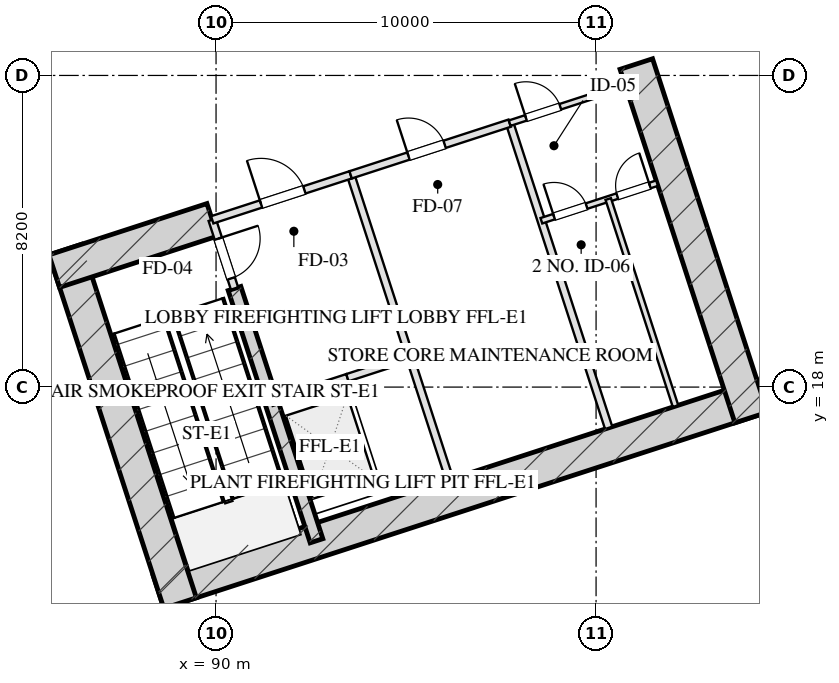
"""IFC4 building model, lengths in metres.
Left out: names, types, materials, properties, quantities, classifications, styles, units other than length and angle.
Written with IfcOpenShell. Run it as: python <this file> out.ifc"""

import sys

from ifc_helpers import new_model, si_unit, direction, frame, frame_2d, origin, place, context, subcontext, project, spatial, rectangle, extrude, element, fill, save


model = new_model("IFC4")
c1 = context("Model", 3, precision=1e-05, world=origin(), true_north=direction((0.0, 1.0)))
c2 = subcontext(c1, "Body", "Model", "MODEL_VIEW")
j1 = project(units=[si_unit("LENGTHUNIT", "METRE"), si_unit("PLANEANGLEUNIT", "RADIAN")], contexts=[c1])
p1 = place(None, origin())
s1 = spatial("IfcSite", under=j1, at=p1, CompositionType="ELEMENT")
p2 = place(p1, origin())
s2 = spatial("IfcBuilding", under=s1, at=p2, CompositionType="ELEMENT")
p3 = place(p2, frame((0.0, 0.0, -12.0)))
s3 = spatial("IfcBuildingStorey", under=s2, at=p3, CompositionType="ELEMENT", Elevation=-12.0)
p4 = place(p3, frame((88.487, 12.605, 0.0), z_axis=(0.0, 0.0, 1.0), x_axis=(0.951055016115, 0.309021611416, 0.0)))
e1 = element("IfcWall", 1, at=p4, inside=s3, PredefinedType="SHEAR", context=c2, shape_type="SweptSolid", body=[
    extrude(rectangle(XDim=16.7, YDim=0.9, at=frame_2d((8.35, 0.0))), origin(), (0.0, 0.0, 1.0), 6.0),
])
p5 = place(p3, frame((86.032, 21.618, 0.0), z_axis=(0.0, 0.0, 1.0), x_axis=(0.30901438634, -0.951057363693, 0.0)))
e2 = element("IfcWall", 2, at=p5, inside=s3, PredefinedType="SHEAR", context=c2, shape_type="SweptSolid", body=[
    extrude(rectangle(XDim=9.78, YDim=0.9, at=frame_2d((4.89, 0.0))), origin(), (0.0, 0.0, 1.0), 6.0),
])
p6 = place(p3, frame((101.059, 26.5, 0.0), z_axis=(0.0, 0.0, 1.0), x_axis=(0.309021722829, -0.951054979914, 0.0)))
e3 = element("IfcWall", 3, at=p6, inside=s3, PredefinedType="SHEAR", context=c2, shape_type="SweptSolid", body=[
    extrude(rectangle(XDim=9.78, YDim=0.9, at=frame_2d((4.89, 0.0))), origin(), (0.0, 0.0, 1.0), 6.0),
])
p7 = place(p3, frame((90.486, 20.594, 0.0), z_axis=(0.0, 0.0, 1.0), x_axis=(0.309020428229, -0.951055400562, 0.0)))
e4 = element("IfcWall", 4, at=p7, inside=s3, PredefinedType="SHEAR", context=c2, shape_type="SweptSolid", body=[
    extrude(rectangle(XDim=6.98, YDim=0.35, at=frame_2d((3.49, 0.0))), origin(), (0.0, 0.0, 1.0), 6.0),
])
p8 = place(p3, frame((85.743, 21.051, 0.0), z_axis=(0.0, 0.0, 1.0), x_axis=(0.951063623806, 0.308995118848, 0.0)))
e5 = element("IfcWall", 5, at=p8, inside=s3, PredefinedType="SHEAR", context=c2, shape_type="SweptSolid", body=[
    extrude(rectangle(XDim=4.37, YDim=0.9, at=frame_2d((2.185, 0.0))), origin(), (0.0, 0.0, 1.0), 6.0),
])
p9 = place(p3, frame((89.899, 22.401, 0.0), z_axis=(0.0, 0.0, 1.0), x_axis=(0.308932062672, -0.951084108086, 0.0)))
e6 = element("IfcWall", 6, at=p9, inside=s3, PredefinedType="PARTITIONING", context=c2, shape_type="SweptSolid", body=[
    extrude(rectangle(XDim=1.9, YDim=0.2, at=frame_2d((0.95, 0.0))), origin(), (0.0, 0.0, 1.0), 5.635),
])
p10 = place(p9, frame((0.52, 0.0, 0.0)))
e7 = element("IfcOpeningElement", 7, at=p10, cuts=e6, PredefinedType="OPENING", context=c2, shape_type="SweptSolid", body=[
    extrude(rectangle(XDim=1.1, YDim=2.05, at=frame_2d((0.55, 1.025))), frame((0.0, 0.11, 0.0), z_axis=(0.0, -1.0, 0.0), x_axis=(1.0, 0.0, 0.0)), (0.0, 0.0, 1.0), 0.22),
])
p11 = place(p3, frame((93.542, 23.585, 0.0), z_axis=(0.0, 0.0, 1.0), x_axis=(0.309042196757, -0.951048327176, 0.0)))
e8 = element("IfcWall", 8, at=p11, inside=s3, PredefinedType="PARTITIONING", context=c2, shape_type="SweptSolid", body=[
    extrude(rectangle(XDim=8.43, YDim=0.2, at=frame_2d((4.215, 0.0))), origin(), (0.0, 0.0, 1.0), 5.635),
])
p12 = place(p3, frame((89.899, 22.401, 0.0), z_axis=(0.0, 0.0, 1.0), x_axis=(0.951046716504, 0.309047153403, 0.0)))
e9 = element("IfcWall", 9, at=p12, inside=s3, PredefinedType="PARTITIONING", context=c2, shape_type="SweptSolid", body=[
    extrude(rectangle(XDim=3.83, YDim=0.2, at=frame_2d((1.915, 0.0))), origin(), (0.0, 0.0, 1.0), 5.635),
])
p13 = place(p12, frame((1.35, 0.0, 0.0)))
e10 = element("IfcOpeningElement", 10, at=p13, cuts=e9, PredefinedType="OPENING", context=c2, shape_type="SweptSolid", body=[
    extrude(rectangle(XDim=1.2, YDim=2.05, at=frame_2d((0.6, 1.025))), frame((0.0, 0.11, 0.0), z_axis=(0.0, -1.0, 0.0), x_axis=(1.0, 0.0, 0.0)), (0.0, 0.0, 1.0), 0.22),
])
p14 = place(p3, frame((91.46, 17.598, 0.0), z_axis=(0.0, 0.0, 1.0), x_axis=(0.951062257173, 0.308999325213, 0.0)))
e11 = element("IfcWall", 11, at=p14, inside=s3, PredefinedType="PARTITIONING", context=c2, shape_type="SweptSolid", body=[
    extrude(rectangle(XDim=2.1, YDim=0.2, at=frame_2d((1.05, 0.0))), origin(), (0.0, 0.0, 1.0), 5.635),
])
p15 = place(p3, frame((93.457, 18.247, 0.0), z_axis=(0.0, 0.0, 1.0), x_axis=(0.951041328149, 0.309063734775, 0.0)))
e12 = element("IfcWall", 12, at=p15, inside=s3, PredefinedType="PARTITIONING", context=c2, shape_type="SweptSolid", body=[
    extrude(rectangle(XDim=1.73, YDim=0.2, at=frame_2d((0.865, 0.0))), origin(), (0.0, 0.0, 1.0), 5.635),
])
p16 = place(p3, frame((97.727, 24.944, 0.0), z_axis=(0.0, 0.0, 1.0), x_axis=(0.309016001439, -0.951056838919, 0.0)))
e13 = element("IfcWall", 13, at=p16, inside=s3, PredefinedType="PARTITIONING", context=c2, shape_type="SweptSolid", body=[
    extrude(rectangle(XDim=8.43, YDim=0.2, at=frame_2d((4.215, 0.0))), origin(), (0.0, 0.0, 1.0), 5.635),
])
p17 = place(p3, frame((93.542, 23.585, 0.0), z_axis=(0.0, 0.0, 1.0), x_axis=(0.951063829732, 0.308994485023, 0.0)))
e14 = element("IfcWall", 14, at=p17, inside=s3, PredefinedType="PARTITIONING", context=c2, shape_type="SweptSolid", body=[
    extrude(rectangle(XDim=4.4, YDim=0.2, at=frame_2d((2.2, 0.0))), origin(), (0.0, 0.0, 1.0), 5.635),
])
p18 = place(p17, frame((1.6, 0.0, 0.0)))
e15 = element("IfcOpeningElement", 15, at=p18, cuts=e14, PredefinedType="OPENING", context=c2, shape_type="SweptSolid", body=[
    extrude(rectangle(XDim=1.0, YDim=2.05, at=frame_2d((0.5, 1.025))), frame((0.0, 0.11, 0.0), z_axis=(0.0, -1.0, 0.0), x_axis=(1.0, 0.0, 0.0)), (0.0, 0.0, 1.0), 0.22),
])
p19 = place(p3, frame((97.727, 24.944, 0.0), z_axis=(0.0, 0.0, 1.0), x_axis=(0.951036872128, 0.309077446369, 0.0)))
e16 = element("IfcWall", 16, at=p19, inside=s3, PredefinedType="PARTITIONING", context=c2, shape_type="SweptSolid", body=[
    extrude(rectangle(XDim=3.2, YDim=0.15, at=frame_2d((1.6, 0.0))), origin(), (0.0, 0.0, 1.0), 5.635),
])
p20 = place(p19, frame((0.45, 0.0, 0.0)))
e17 = element("IfcOpeningElement", 17, at=p20, cuts=e16, PredefinedType="OPENING", context=c2, shape_type="SweptSolid", body=[
    extrude(rectangle(XDim=0.95, YDim=2.05, at=frame_2d((0.475, 1.025))), frame((0.0, 0.085, 0.0), z_axis=(0.0, -1.0, 0.0), x_axis=(1.0, 0.0, 0.0)), (0.0, 0.0, 1.0), 0.17),
])
p21 = place(p3, frame((98.561, 22.376, 0.0), z_axis=(0.0, 0.0, 1.0), x_axis=(0.95104415986, 0.309055020985, 0.0)))
e18 = element("IfcWall", 18, at=p21, inside=s3, PredefinedType="PARTITIONING", context=c2, shape_type="SweptSolid", body=[
    extrude(rectangle(XDim=3.2, YDim=0.15, at=frame_2d((1.6, 0.0))), origin(), (0.0, 0.0, 1.0), 5.635),
])
p22 = place(p21, frame((0.35, 0.0, 0.0)))
e19 = element("IfcOpeningElement", 19, at=p22, cuts=e18, PredefinedType="OPENING", context=c2, shape_type="SweptSolid", body=[
    extrude(rectangle(XDim=0.9, YDim=2.05, at=frame_2d((0.45, 1.025))), frame((0.0, 0.085, 0.0), z_axis=(0.0, -1.0, 0.0), x_axis=(1.0, 0.0, 0.0)), (0.0, 0.0, 1.0), 0.17),
])
p23 = place(p21, frame((2.1, 0.0, 0.0)))
e20 = element("IfcOpeningElement", 20, at=p23, cuts=e18, PredefinedType="OPENING", context=c2, shape_type="SweptSolid", body=[
    extrude(rectangle(XDim=0.9, YDim=2.05, at=frame_2d((0.45, 1.025))), frame((0.0, 0.085, 0.0), z_axis=(0.0, -1.0, 0.0), x_axis=(1.0, 0.0, 0.0)), (0.0, 0.0, 1.0), 0.17),
])
p24 = place(p3, frame((100.32, 22.948, 0.0), z_axis=(0.0, 0.0, 1.0), x_axis=(0.309035009867, -0.951050662518, 0.0)))
e21 = element("IfcWall", 21, at=p24, inside=s3, PredefinedType="PARTITIONING", context=c2, shape_type="SweptSolid", body=[
    extrude(rectangle(XDim=5.73, YDim=0.15, at=frame_2d((2.865, 0.0))), origin(), (0.0, 0.0, 1.0), 5.635),
])
p25 = place(p10, origin())
e22 = element("IfcDoor", 22, at=p25, inside=s3, OperationType="SINGLE_SWING_LEFT", PredefinedType="DOOR", context=c2, shape_type="SweptSolid", body=[
    extrude(rectangle(XDim=1.1, YDim=2.05, at=frame_2d((0.55, 1.025))), frame((0.0, 0.025, 0.0), z_axis=(0.0, -1.0, 0.0), x_axis=(1.0, 0.0, 0.0)), (0.0, 0.0, 1.0), 0.05),
])
fill(e7, e22)
p26 = place(p13, origin())
e23 = element("IfcDoor", 23, at=p26, inside=s3, OperationType="SINGLE_SWING_LEFT", PredefinedType="DOOR", context=c2, shape_type="SweptSolid", body=[
    extrude(rectangle(XDim=1.2, YDim=2.05, at=frame_2d((0.6, 1.025))), frame((0.0, 0.025, 0.0), z_axis=(0.0, -1.0, 0.0), x_axis=(1.0, 0.0, 0.0)), (0.0, 0.0, 1.0), 0.05),
])
fill(e10, e23)
p27 = place(p18, origin())
e24 = element("IfcDoor", 24, at=p27, inside=s3, OperationType="SINGLE_SWING_LEFT", PredefinedType="DOOR", context=c2, shape_type="SweptSolid", body=[
    extrude(rectangle(XDim=1.0, YDim=2.05, at=frame_2d((0.5, 1.025))), frame((0.0, 0.025, 0.0), z_axis=(0.0, -1.0, 0.0), x_axis=(1.0, 0.0, 0.0)), (0.0, 0.0, 1.0), 0.05),
])
fill(e15, e24)
p28 = place(p20, origin())
e25 = element("IfcDoor", 25, at=p28, inside=s3, OperationType="SINGLE_SWING_LEFT", PredefinedType="DOOR", context=c2, shape_type="SweptSolid", body=[
    extrude(rectangle(XDim=0.95, YDim=2.05, at=frame_2d((0.475, 1.025))), frame((0.0, 0.025, 0.0), z_axis=(0.0, -1.0, 0.0), x_axis=(1.0, 0.0, 0.0)), (0.0, 0.0, 1.0), 0.05),
])
fill(e17, e25)
p29 = place(p22, origin())
e26 = element("IfcDoor", 26, at=p29, inside=s3, OperationType="SINGLE_SWING_LEFT", PredefinedType="DOOR", context=c2, shape_type="SweptSolid", body=[
    extrude(rectangle(XDim=0.9, YDim=2.05, at=frame_2d((0.45, 1.025))), frame((0.0, 0.025, 0.0), z_axis=(0.0, -1.0, 0.0), x_axis=(1.0, 0.0, 0.0)), (0.0, 0.0, 1.0), 0.05),
])
fill(e19, e26)
p30 = place(p23, origin())
e27 = element("IfcDoor", 27, at=p30, inside=s3, OperationType="SINGLE_SWING_RIGHT", PredefinedType="DOOR", context=c2, shape_type="SweptSolid", body=[
    extrude(rectangle(XDim=0.9, YDim=2.05, at=frame_2d((0.45, 1.025))), frame((0.0, 0.025, 0.0), z_axis=(0.0, -1.0, 0.0), x_axis=(1.0, 0.0, 0.0)), (0.0, 0.0, 1.0), 0.05),
])
fill(e20, e27)
save(model, sys.argv[1])
